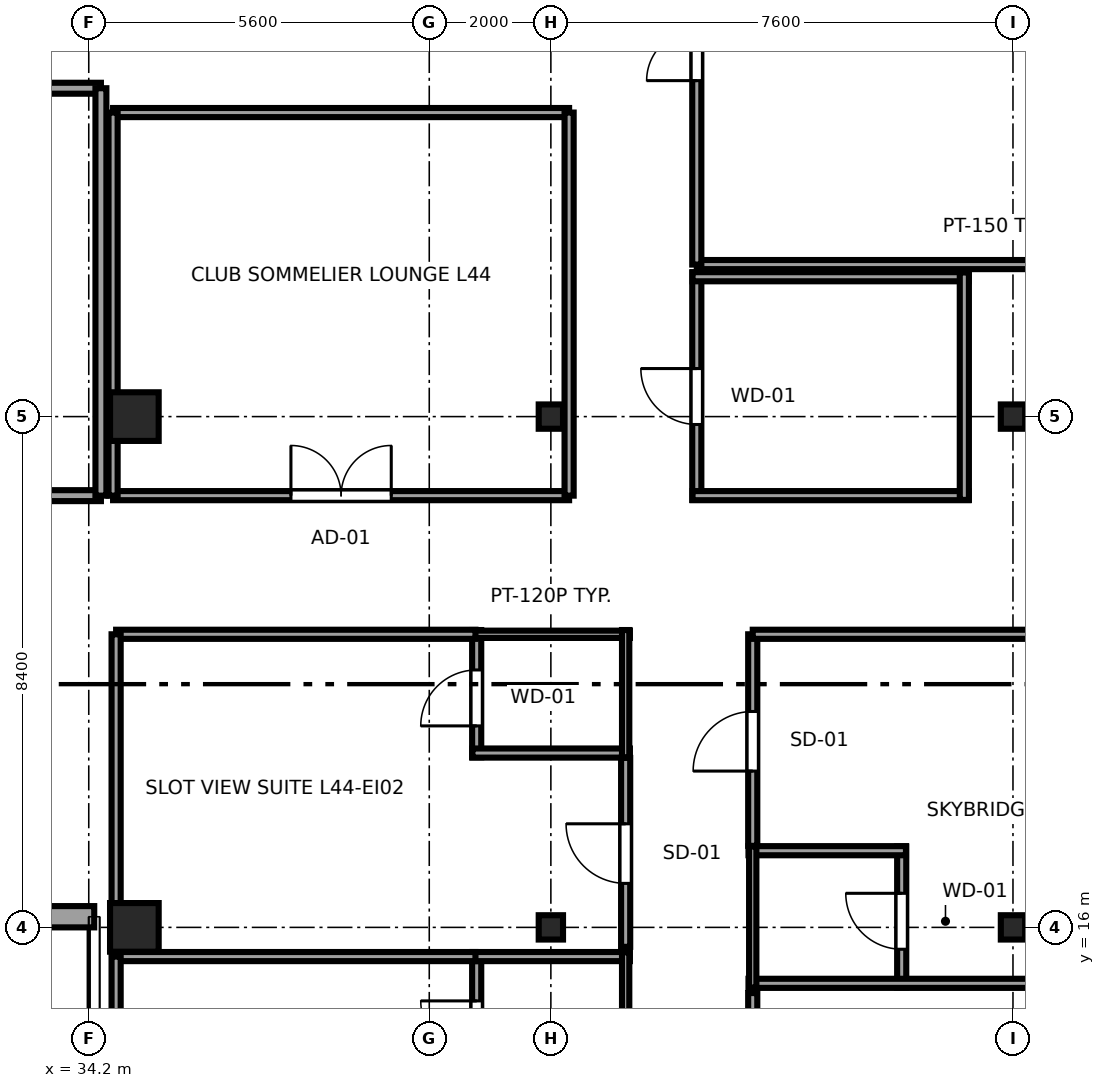
"""IFC4 building model, lengths in metres.
Left out: names, types, materials, properties, quantities, classifications, styles, units other than length and angle.
Written with IfcOpenShell. Run it as: python <this file> out.ifc"""

import sys

from ifc_helpers import new_model, si_unit, direction, frame, frame_2d, origin, origin_2d, place, context, subcontext, project, spatial, rectangle, i_section, extrude, source, transform, mapped, element, fill, save


model = new_model("IFC4")
c1 = context("Model", 3, precision=1e-05, world=origin(), true_north=direction((0.0, 1.0)))
c2 = subcontext(c1, "Body", "Model", "MODEL_VIEW")
j1 = project(units=[si_unit("LENGTHUNIT", "METRE"), si_unit("PLANEANGLEUNIT", "RADIAN")], contexts=[c1])
p1 = place(None, origin())
s1 = spatial("IfcSite", under=j1, at=p1, CompositionType="ELEMENT")
p2 = place(p1, origin())
s2 = spatial("IfcBuilding", under=s1, at=p2, CompositionType="ELEMENT")
p3 = place(p2, frame((0.0, 0.0, 168.35)))
s3 = spatial("IfcBuildingStorey", under=s2, at=p3, CompositionType="ELEMENT", Elevation=168.35)
m1 = source(origin(), c2, "Body", "SweptSolid", [
    extrude(rectangle(XDim=0.8, YDim=0.8, at=origin_2d()), origin(), (0.0, 0.0, 1.0), 3.55),
])
for number, where, z_axis, x_axis in (
    (1, (34.95, 16.0, 0.0), (0.0, 0.0, 1.0), (1.0, 0.0, 0.0)),
    (2, (34.95, 24.4, 0.0), (0.0, 0.0, 1.0), (1.0, 0.0, 0.0)),
):
    element("IfcColumn", number, at=place(p3, frame(where, z_axis=z_axis, x_axis=x_axis)), inside=s3, PredefinedType="COLUMN", context=c2, shape_type="MappedRepresentation", body=[
        mapped(m1, transform((0.0, 0.0, 0.0), x_axis=(1.0, 0.0, 0.0), y_axis=(0.0, 1.0, 0.0), z_axis=(0.0, 0.0, 1.0), scale=1.0)),
    ])
m2 = source(origin(), c2, "Body", "SweptSolid", [
    extrude(i_section(OverallWidth=0.4, OverallDepth=0.4, WebThickness=0.02, FlangeThickness=0.035, at=origin_2d()), origin(), (0.0, 0.0, 1.0), 3.55),
])
for number, where, z_axis, x_axis in (
    (3, (41.8, 16.0, 0.0), (0.0, 0.0, 1.0), (1.0, 0.0, 0.0)),
    (4, (41.8, 24.4, 0.0), (0.0, 0.0, 1.0), (1.0, 0.0, 0.0)),
    (5, (49.4, 16.0, 0.0), (0.0, 0.0, 1.0), (1.0, 0.0, 0.0)),
    (6, (49.4, 24.4, 0.0), (0.0, 0.0, 1.0), (1.0, 0.0, 0.0)),
):
    element("IfcColumn", number, at=place(p3, frame(where, z_axis=z_axis, x_axis=x_axis)), inside=s3, PredefinedType="COLUMN", context=c2, shape_type="MappedRepresentation", body=[
        mapped(m2, transform((0.0, 0.0, 0.0), x_axis=(1.0, 0.0, 0.0), y_axis=(0.0, 1.0, 0.0), z_axis=(0.0, 0.0, 1.0), scale=1.0)),
    ])
p4 = place(p3, frame((22.71, 16.175, 0.0), z_axis=(0.0, 0.0, 1.0), x_axis=(1.0, 0.0, 0.0)))
e7 = element("IfcWall", 7, at=p4, inside=s3, PredefinedType="SOLIDWALL", context=c2, shape_type="SweptSolid", body=[
    extrude(rectangle(XDim=11.58, YDim=0.35, at=frame_2d((5.79, 0.0))), origin(), (0.0, 0.0, 1.0), 2.758),
])
p5 = place(p4, frame((1.995, 0.0, 0.68)))
e8 = element("IfcOpeningElement", 8, at=p5, cuts=e7, PredefinedType="OPENING", context=c2, shape_type="SweptSolid", body=[
    extrude(rectangle(XDim=2.4, YDim=1.9, at=frame_2d((1.2, 0.95))), frame((0.0, 0.185, 0.0), z_axis=(0.0, -1.0, 0.0), x_axis=(1.0, 0.0, 0.0)), (0.0, 0.0, 1.0), 0.37),
])
p6 = place(p4, frame((7.185, 0.0, 0.68)))
e9 = element("IfcOpeningElement", 9, at=p6, cuts=e7, PredefinedType="OPENING", context=c2, shape_type="SweptSolid", body=[
    extrude(rectangle(XDim=2.4, YDim=1.9, at=frame_2d((1.2, 0.95))), frame((0.0, 0.185, 0.0), z_axis=(0.0, -1.0, 0.0), x_axis=(1.0, 0.0, 0.0)), (0.0, 0.0, 1.0), 0.37),
])
p7 = place(p3, frame((40.58, 13.212, 0.0), z_axis=(0.0, 0.0, 1.0), x_axis=(0.0, 1.0, 0.0)))
e10 = element("IfcWall", 10, at=p7, inside=s3, PredefinedType="PARTITIONING", context=c2, shape_type="SweptSolid", body=[
    extrude(rectangle(XDim=2.378, YDim=0.15, at=frame_2d((1.189, 0.0))), origin(), (0.0, 0.0, 1.0), 3.37),
])
p8 = place(p7, frame((0.659, 0.0, 0.0)))
e11 = element("IfcOpeningElement", 11, at=p8, cuts=e10, PredefinedType="OPENING", context=c2, shape_type="SweptSolid", body=[
    extrude(rectangle(XDim=0.92, YDim=2.01, at=frame_2d((0.46, 1.005))), frame((0.0, 0.085, 0.0), z_axis=(0.0, -1.0, 0.0), x_axis=(1.0, 0.0, 0.0)), (0.0, 0.0, 1.0), 0.17),
])
p9 = place(p3, frame((40.51, 15.52, 0.0), z_axis=(0.0, 0.0, 1.0), x_axis=(1.0, 0.0, 0.0)))
e12 = element("IfcWall", 12, at=p9, inside=s3, PredefinedType="PARTITIONING", context=c2, shape_type="SweptSolid", body=[
    extrude(rectangle(XDim=2.59, YDim=0.15, at=frame_2d((1.295, 0.0))), origin(), (0.0, 0.0, 1.0), 3.37),
])
p10 = place(p3, frame((43.03, 13.212, 0.0), z_axis=(0.0, 0.0, 1.0), x_axis=(0.0, 1.0, 0.0)))
e13 = element("IfcWall", 13, at=p10, inside=s3, PredefinedType="PLUMBINGWALL", context=c2, shape_type="SweptSolid", body=[
    extrude(rectangle(XDim=2.378, YDim=0.12, at=frame_2d((1.189, 0.0))), origin(), (0.0, 0.0, 1.0), 3.37),
])
p11 = place(p3, frame((40.58, 18.797, 0.0), z_axis=(0.0, 0.0, 1.0), x_axis=(0.0, 1.0, 0.0)))
e14 = element("IfcWall", 14, at=p11, inside=s3, PredefinedType="PARTITIONING", context=c2, shape_type="SweptSolid", body=[
    extrude(rectangle(XDim=2.093, YDim=0.15, at=frame_2d((1.046, 0.0))), origin(), (0.0, 0.0, 1.0), 3.37),
])
p12 = place(p11, frame((0.517, 0.0, 0.0)))
e15 = element("IfcOpeningElement", 15, at=p12, cuts=e14, PredefinedType="OPENING", context=c2, shape_type="SweptSolid", body=[
    extrude(rectangle(XDim=0.92, YDim=2.01, at=frame_2d((0.46, 1.005))), frame((0.0, 0.085, 0.0), z_axis=(0.0, -1.0, 0.0), x_axis=(1.0, 0.0, 0.0)), (0.0, 0.0, 1.0), 0.17),
])
p13 = place(p3, frame((40.51, 18.867, 0.0), z_axis=(0.0, 0.0, 1.0), x_axis=(1.0, 0.0, 0.0)))
e16 = element("IfcWall", 16, at=p13, inside=s3, PredefinedType="PARTITIONING", context=c2, shape_type="SweptSolid", body=[
    extrude(rectangle(XDim=2.59, YDim=0.15, at=frame_2d((1.295, 0.0))), origin(), (0.0, 0.0, 1.0), 3.37),
])
p14 = place(p3, frame((40.51, 20.82, 0.0), z_axis=(0.0, 0.0, 1.0), x_axis=(1.0, 0.0, 0.0)))
e17 = element("IfcWall", 17, at=p14, inside=s3, PredefinedType="PLUMBINGWALL", context=c2, shape_type="SweptSolid", body=[
    extrude(rectangle(XDim=2.59, YDim=0.12, at=frame_2d((1.295, 0.0))), origin(), (0.0, 0.0, 1.0), 3.37),
])
p15 = place(p3, frame((43.03, 18.797, 0.0), z_axis=(0.0, 0.0, 1.0), x_axis=(0.0, 1.0, 0.0)))
e18 = element("IfcWall", 18, at=p15, inside=s3, PredefinedType="PLUMBINGWALL", context=c2, shape_type="SweptSolid", body=[
    extrude(rectangle(XDim=2.093, YDim=0.12, at=frame_2d((1.046, 0.0))), origin(), (0.0, 0.0, 1.0), 3.37),
])
p16 = place(p3, frame((47.57, 15.01, 0.0), z_axis=(0.0, 0.0, 1.0), x_axis=(0.0, 1.0, 0.0)))
e19 = element("IfcWall", 19, at=p16, inside=s3, PredefinedType="PARTITIONING", context=c2, shape_type="SweptSolid", body=[
    extrude(rectangle(XDim=2.321, YDim=0.15, at=frame_2d((1.161, 0.0))), origin(), (0.0, 0.0, 1.0), 3.37),
])
p17 = place(p16, frame((0.631, 0.0, 0.0)))
e20 = element("IfcOpeningElement", 20, at=p17, cuts=e19, PredefinedType="OPENING", context=c2, shape_type="SweptSolid", body=[
    extrude(rectangle(XDim=0.92, YDim=2.01, at=frame_2d((0.46, 1.005))), frame((0.0, 0.085, 0.0), z_axis=(0.0, -1.0, 0.0), x_axis=(1.0, 0.0, 0.0)), (0.0, 0.0, 1.0), 0.17),
])
p18 = place(p3, frame((45.05, 15.08, 0.0), z_axis=(0.0, 0.0, 1.0), x_axis=(1.0, 0.0, 0.0)))
e21 = element("IfcWall", 21, at=p18, inside=s3, PredefinedType="PARTITIONING", context=c2, shape_type="SweptSolid", body=[
    extrude(rectangle(XDim=9.05, YDim=0.15, at=frame_2d((4.525, 0.0))), origin(), (0.0, 0.0, 1.0), 3.37),
])
p19 = place(p3, frame((45.05, 17.261, 0.0), z_axis=(0.0, 0.0, 1.0), x_axis=(1.0, 0.0, 0.0)))
e22 = element("IfcWall", 22, at=p19, inside=s3, PredefinedType="PARTITIONING", context=c2, shape_type="SweptSolid", body=[
    extrude(rectangle(XDim=2.59, YDim=0.15, at=frame_2d((1.295, 0.0))), origin(), (0.0, 0.0, 1.0), 3.37),
])
p20 = place(p3, frame((45.12, 15.01, 0.0), z_axis=(0.0, 0.0, 1.0), x_axis=(0.0, 1.0, 0.0)))
e23 = element("IfcWall", 23, at=p20, inside=s3, PredefinedType="PLUMBINGWALL", context=c2, shape_type="SweptSolid", body=[
    extrude(rectangle(XDim=2.321, YDim=0.12, at=frame_2d((1.161, 0.0))), origin(), (0.0, 0.0, 1.0), 3.37),
])
p21 = place(p3, frame((34.65, 15.52, 0.0), z_axis=(0.0, 0.0, 1.0), x_axis=(1.0, 0.0, 0.0)))
e24 = element("IfcWall", 24, at=p21, inside=s3, PredefinedType="PARTITIONING", context=c2, shape_type="SweptSolid", body=[
    extrude(rectangle(XDim=5.91, YDim=0.15, at=frame_2d((2.955, 0.0))), origin(), (0.0, 0.0, 1.0), 3.37),
])
p22 = place(p3, frame((34.65, 9.63, 0.0), z_axis=(0.0, 0.0, 1.0), x_axis=(0.0, 1.0, 0.0)))
e25 = element("IfcWall", 25, at=p22, inside=s3, PredefinedType="PARTITIONING", context=c2, shape_type="SweptSolid", body=[
    extrude(rectangle(XDim=5.89, YDim=0.15, at=frame_2d((2.945, 0.0))), origin(), (0.0, 0.0, 1.0), 3.37),
])
p23 = place(p3, frame((43.03, 15.68, 0.0), z_axis=(0.0, 0.0, 1.0), x_axis=(0.0, 1.0, 0.0)))
e26 = element("IfcWall", 26, at=p23, inside=s3, PredefinedType="PARTITIONING", context=c2, shape_type="SweptSolid", body=[
    extrude(rectangle(XDim=3.107, YDim=0.15, at=frame_2d((1.554, 0.0))), origin(), (0.0, 0.0, 1.0), 3.37),
])
p24 = place(p23, frame((1.043, 0.0, 0.0)))
e27 = element("IfcOpeningElement", 27, at=p24, cuts=e26, PredefinedType="OPENING", context=c2, shape_type="SweptSolid", body=[
    extrude(rectangle(XDim=0.98, YDim=2.12, at=frame_2d((0.49, 1.06))), frame((0.0, 0.085, 0.0), z_axis=(0.0, -1.0, 0.0), x_axis=(1.0, 0.0, 0.0)), (0.0, 0.0, 1.0), 0.17),
])
p25 = place(p3, frame((34.65, 20.82, 0.0), z_axis=(0.0, 0.0, 1.0), x_axis=(1.0, 0.0, 0.0)))
e28 = element("IfcWall", 28, at=p25, inside=s3, PredefinedType="PARTITIONING", context=c2, shape_type="SweptSolid", body=[
    extrude(rectangle(XDim=5.91, YDim=0.15, at=frame_2d((2.955, 0.0))), origin(), (0.0, 0.0, 1.0), 3.37),
])
p26 = place(p3, frame((34.65, 15.68, 0.0), z_axis=(0.0, 0.0, 1.0), x_axis=(0.0, 1.0, 0.0)))
e29 = element("IfcWall", 29, at=p26, inside=s3, PredefinedType="PARTITIONING", context=c2, shape_type="SweptSolid", body=[
    extrude(rectangle(XDim=5.14, YDim=0.15, at=frame_2d((2.57, 0.0))), origin(), (0.0, 0.0, 1.0), 3.37),
])
p27 = place(p3, frame((45.12, 11.379, 0.0), z_axis=(0.0, 0.0, 1.0), x_axis=(0.0, 1.0, 0.0)))
e30 = element("IfcWall", 30, at=p27, inside=s3, PredefinedType="PARTITIONING", context=c2, shape_type="SweptSolid", body=[
    extrude(rectangle(XDim=3.541, YDim=0.15, at=frame_2d((1.771, 0.0))), origin(), (0.0, 0.0, 1.0), 3.37),
])
p28 = place(p27, frame((1.26, 0.0, 0.0)))
e31 = element("IfcOpeningElement", 31, at=p28, cuts=e30, PredefinedType="OPENING", context=c2, shape_type="SweptSolid", body=[
    extrude(rectangle(XDim=0.98, YDim=2.12, at=frame_2d((0.49, 1.06))), frame((0.0, 0.085, 0.0), z_axis=(0.0, -1.0, 0.0), x_axis=(1.0, 0.0, 0.0)), (0.0, 0.0, 1.0), 0.17),
])
p29 = place(p3, frame((45.12, 17.341, 0.0), z_axis=(0.0, 0.0, 1.0), x_axis=(0.0, 1.0, 0.0)))
e32 = element("IfcWall", 32, at=p29, inside=s3, PredefinedType="PARTITIONING", context=c2, shape_type="SweptSolid", body=[
    extrude(rectangle(XDim=3.479, YDim=0.15, at=frame_2d((1.74, 0.0))), origin(), (0.0, 0.0, 1.0), 3.37),
])
p30 = place(p29, frame((1.229, 0.0, 0.0)))
e33 = element("IfcOpeningElement", 33, at=p30, cuts=e32, PredefinedType="OPENING", context=c2, shape_type="SweptSolid", body=[
    extrude(rectangle(XDim=0.98, YDim=2.12, at=frame_2d((0.49, 1.06))), frame((0.0, 0.085, 0.0), z_axis=(0.0, -1.0, 0.0), x_axis=(1.0, 0.0, 0.0)), (0.0, 0.0, 1.0), 0.17),
])
p31 = place(p3, frame((45.12, 20.82, 0.0), z_axis=(0.0, 0.0, 1.0), x_axis=(1.0, 0.0, 0.0)))
e34 = element("IfcWall", 34, at=p31, inside=s3, PredefinedType="PARTITIONING", context=c2, shape_type="SweptSolid", body=[
    extrude(rectangle(XDim=8.98, YDim=0.15, at=frame_2d((4.49, 0.0))), origin(), (0.0, 0.0, 1.0), 3.37),
])
p32 = place(p3, frame((44.2, 23.03, 0.0), z_axis=(0.0, 0.0, 1.0), x_axis=(0.0, 1.0, 0.0)))
e35 = element("IfcWall", 35, at=p32, inside=s3, PredefinedType="PARTITIONING", context=c2, shape_type="SweptSolid", body=[
    extrude(rectangle(XDim=3.74, YDim=0.15, at=frame_2d((1.87, 0.0))), origin(), (0.0, 0.0, 1.0), 3.37),
])
p33 = place(p32, frame((1.24, 0.0, 0.0)))
e36 = element("IfcOpeningElement", 36, at=p33, cuts=e35, PredefinedType="OPENING", context=c2, shape_type="SweptSolid", body=[
    extrude(rectangle(XDim=0.92, YDim=2.01, at=frame_2d((0.46, 1.005))), frame((0.0, 0.085, 0.0), z_axis=(0.0, -1.0, 0.0), x_axis=(1.0, 0.0, 0.0)), (0.0, 0.0, 1.0), 0.17),
])
for number, where, z_axis, x_axis in (
    (37, (44.13, 23.1, 0.0), (0.0, 0.0, 1.0), (1.0, 0.0, 0.0)),
    (38, (44.13, 26.7, 0.0), (0.0, 0.0, 1.0), (1.0, 0.0, 0.0)),
):
    element("IfcWall", number, at=place(p3, frame(where, z_axis=z_axis, x_axis=x_axis)), inside=s3, PredefinedType="PARTITIONING", context=c2, shape_type="SweptSolid", body=[
        extrude(rectangle(XDim=4.54, YDim=0.15, at=frame_2d((2.27, 0.0))), origin(), (0.0, 0.0, 1.0), 3.37),
    ])
p34 = place(p3, frame((48.6, 23.03, 0.0), z_axis=(0.0, 0.0, 1.0), x_axis=(0.0, 1.0, 0.0)))
e39 = element("IfcWall", 39, at=p34, inside=s3, PredefinedType="PARTITIONING", context=c2, shape_type="SweptSolid", body=[
    extrude(rectangle(XDim=3.74, YDim=0.15, at=frame_2d((1.87, 0.0))), origin(), (0.0, 0.0, 1.0), 3.37),
])
p35 = place(p3, frame((44.2, 26.9, 0.0), z_axis=(0.0, 0.0, 1.0), x_axis=(1.0, 0.0, 0.0)))
e40 = element("IfcWall", 40, at=p35, inside=s3, PredefinedType="PARTITIONING", context=c2, shape_type="SweptSolid", body=[
    extrude(rectangle(XDim=9.9, YDim=0.15, at=frame_2d((4.95, 0.0))), origin(), (0.0, 0.0, 1.0), 3.37),
])
p36 = place(p3, frame((44.2, 26.9, 0.0), z_axis=(0.0, 0.0, 1.0), x_axis=(0.0, 1.0, 0.0)))
e41 = element("IfcWall", 41, at=p36, inside=s3, PredefinedType="PARTITIONING", context=c2, shape_type="SweptSolid", body=[
    extrude(rectangle(XDim=7.7, YDim=0.15, at=frame_2d((3.85, 0.0))), origin(), (0.0, 0.0, 1.0), 3.37),
])
p37 = place(p36, frame((3.025, 0.0, 0.0)))
e42 = element("IfcOpeningElement", 42, at=p37, cuts=e41, PredefinedType="OPENING", context=c2, shape_type="SweptSolid", body=[
    extrude(rectangle(XDim=1.65, YDim=2.15, at=frame_2d((0.825, 1.075))), frame((0.0, 0.085, 0.0), z_axis=(0.0, -1.0, 0.0), x_axis=(1.0, 0.0, 0.0)), (0.0, 0.0, 1.0), 0.17),
])
p38 = place(p3, frame((27.1, 23.1, 0.0), z_axis=(0.0, 0.0, 1.0), x_axis=(1.0, 0.0, 0.0)))
e43 = element("IfcWall", 43, at=p38, inside=s3, PredefinedType="PARTITIONING", context=c2, shape_type="SweptSolid", body=[
    extrude(rectangle(XDim=7.3, YDim=0.18, at=frame_2d((3.65, 0.0))), origin(), (0.0, 0.0, 1.0), 3.37),
])
p39 = place(p38, frame((2.825, 0.0, 0.0)))
e44 = element("IfcOpeningElement", 44, at=p39, cuts=e43, PredefinedType="OPENING", context=c2, shape_type="SweptSolid", body=[
    extrude(rectangle(XDim=1.65, YDim=2.15, at=frame_2d((0.825, 1.075))), frame((0.0, 0.1, 0.0), z_axis=(0.0, -1.0, 0.0), x_axis=(1.0, 0.0, 0.0)), (0.0, 0.0, 1.0), 0.2),
])
p40 = place(p3, frame((27.1, 29.8, 0.0), z_axis=(0.0, 0.0, 1.0), x_axis=(1.0, 0.0, 0.0)))
e45 = element("IfcWall", 45, at=p40, inside=s3, PredefinedType="PARTITIONING", context=c2, shape_type="SweptSolid", body=[
    extrude(rectangle(XDim=7.3, YDim=0.18, at=frame_2d((3.65, 0.0))), origin(), (0.0, 0.0, 1.0), 3.37),
])
p41 = place(p3, frame((34.4, 23.1, 0.0), z_axis=(0.0, 0.0, 1.0), x_axis=(0.0, 1.0, 0.0)))
e46 = element("IfcWall", 46, at=p41, inside=s3, PredefinedType="PARTITIONING", context=c2, shape_type="SweptSolid", body=[
    extrude(rectangle(XDim=6.7, YDim=0.18, at=frame_2d((3.35, 0.0))), origin(), (0.0, 0.0, 1.0), 3.37),
])
p42 = place(p3, frame((34.6, 23.1, 0.0), z_axis=(0.0, 0.0, 1.0), x_axis=(1.0, 0.0, 0.0)))
e47 = element("IfcWall", 47, at=p42, inside=s3, PredefinedType="PARTITIONING", context=c2, shape_type="SweptSolid", body=[
    extrude(rectangle(XDim=7.5, YDim=0.15, at=frame_2d((3.75, 0.0))), origin(), (0.0, 0.0, 1.0), 3.37),
])
p43 = place(p42, frame((2.925, 0.0, 0.0)))
e48 = element("IfcOpeningElement", 48, at=p43, cuts=e47, PredefinedType="OPENING", context=c2, shape_type="SweptSolid", body=[
    extrude(rectangle(XDim=1.65, YDim=2.15, at=frame_2d((0.825, 1.075))), frame((0.0, 0.085, 0.0), z_axis=(0.0, -1.0, 0.0), x_axis=(1.0, 0.0, 0.0)), (0.0, 0.0, 1.0), 0.17),
])
p44 = place(p3, frame((34.6, 29.4, 0.0), z_axis=(0.0, 0.0, 1.0), x_axis=(1.0, 0.0, 0.0)))
e49 = element("IfcWall", 49, at=p44, inside=s3, PredefinedType="PARTITIONING", context=c2, shape_type="SweptSolid", body=[
    extrude(rectangle(XDim=7.5, YDim=0.15, at=frame_2d((3.75, 0.0))), origin(), (0.0, 0.0, 1.0), 3.37),
])
p45 = place(p3, frame((34.6, 23.1, 0.0), z_axis=(0.0, 0.0, 1.0), x_axis=(0.0, 1.0, 0.0)))
e50 = element("IfcWall", 50, at=p45, inside=s3, PredefinedType="PARTITIONING", context=c2, shape_type="SweptSolid", body=[
    extrude(rectangle(XDim=6.3, YDim=0.15, at=frame_2d((3.15, 0.0))), origin(), (0.0, 0.0, 1.0), 3.37),
])
p46 = place(p3, frame((42.1, 23.1, 0.0), z_axis=(0.0, 0.0, 1.0), x_axis=(0.0, 1.0, 0.0)))
e51 = element("IfcWall", 51, at=p46, inside=s3, PredefinedType="PARTITIONING", context=c2, shape_type="SweptSolid", body=[
    extrude(rectangle(XDim=6.3, YDim=0.15, at=frame_2d((3.15, 0.0))), origin(), (0.0, 0.0, 1.0), 2.16),
])
m3 = source(origin(), c2, "Body", "SweptSolid", [
    extrude(rectangle(XDim=0.92, YDim=2.01, at=frame_2d((0.46, 1.005))), frame((0.0, 0.025, 0.0), z_axis=(0.0, -1.0, 0.0), x_axis=(1.0, 0.0, 0.0)), (0.0, 0.0, 1.0), 0.05),
])
p47 = place(p8, origin())
e52 = element("IfcDoor", 52, at=p47, inside=s3, OperationType="SINGLE_SWING_RIGHT", PredefinedType="DOOR", context=c2, shape_type="MappedRepresentation", body=[
    mapped(m3, transform((0.0, 0.0, 0.0), x_axis=(1.0, 0.0, 0.0), y_axis=(0.0, 1.0, 0.0), z_axis=(0.0, 0.0, 1.0), scale=1.0)),
])
fill(e11, e52)
p48 = place(p12, origin())
e53 = element("IfcDoor", 53, at=p48, inside=s3, OperationType="SINGLE_SWING_LEFT", PredefinedType="DOOR", context=c2, shape_type="MappedRepresentation", body=[
    mapped(m3, transform((0.0, 0.0, 0.0), x_axis=(1.0, 0.0, 0.0), y_axis=(0.0, 1.0, 0.0), z_axis=(0.0, 0.0, 1.0), scale=1.0)),
])
fill(e15, e53)
p49 = place(p17, origin())
e54 = element("IfcDoor", 54, at=p49, inside=s3, OperationType="SINGLE_SWING_RIGHT", PredefinedType="DOOR", context=c2, shape_type="MappedRepresentation", body=[
    mapped(m3, transform((0.0, 0.0, 0.0), x_axis=(1.0, 0.0, 0.0), y_axis=(0.0, 1.0, 0.0), z_axis=(0.0, 0.0, 1.0), scale=1.0)),
])
fill(e20, e54)
m4 = source(origin(), c2, "Body", "SweptSolid", [
    extrude(rectangle(XDim=0.98, YDim=2.12, at=frame_2d((0.49, 1.06))), frame((0.0, 0.025, 0.0), z_axis=(0.0, -1.0, 0.0), x_axis=(1.0, 0.0, 0.0)), (0.0, 0.0, 1.0), 0.05),
])
p50 = place(p24, origin())
e55 = element("IfcDoor", 55, at=p50, inside=s3, OperationType="SINGLE_SWING_RIGHT", PredefinedType="DOOR", context=c2, shape_type="MappedRepresentation", body=[
    mapped(m4, transform((0.0, 0.0, 0.0), x_axis=(1.0, 0.0, 0.0), y_axis=(0.0, 1.0, 0.0), z_axis=(0.0, 0.0, 1.0), scale=1.0)),
])
fill(e27, e55)
p51 = place(p30, origin())
e56 = element("IfcDoor", 56, at=p51, inside=s3, OperationType="SINGLE_SWING_LEFT", PredefinedType="DOOR", context=c2, shape_type="MappedRepresentation", body=[
    mapped(m4, transform((0.0, 0.0, 0.0), x_axis=(1.0, 0.0, 0.0), y_axis=(0.0, 1.0, 0.0), z_axis=(0.0, 0.0, 1.0), scale=1.0)),
])
fill(e33, e56)
p52 = place(p33, origin())
e57 = element("IfcDoor", 57, at=p52, inside=s3, OperationType="SINGLE_SWING_RIGHT", PredefinedType="DOOR", context=c2, shape_type="MappedRepresentation", body=[
    mapped(m3, transform((0.0, 0.0, 0.0), x_axis=(1.0, 0.0, 0.0), y_axis=(0.0, 1.0, 0.0), z_axis=(0.0, 0.0, 1.0), scale=1.0)),
])
fill(e36, e57)
m5 = source(origin(), c2, "Body", "SweptSolid", [
    extrude(rectangle(XDim=1.65, YDim=2.15, at=frame_2d((0.825, 1.075))), frame((0.0, 0.025, 0.0), z_axis=(0.0, -1.0, 0.0), x_axis=(1.0, 0.0, 0.0)), (0.0, 0.0, 1.0), 0.05),
])
p53 = place(p37, origin())
e58 = element("IfcDoor", 58, at=p53, inside=s3, OperationType="DOUBLE_DOOR_SINGLE_SWING", PredefinedType="DOOR", context=c2, shape_type="MappedRepresentation", body=[
    mapped(m5, transform((0.0, 0.0, 0.0), x_axis=(1.0, 0.0, 0.0), y_axis=(0.0, 1.0, 0.0), z_axis=(0.0, 0.0, 1.0), scale=1.0)),
])
fill(e42, e58)
p54 = place(p43, origin())
e59 = element("IfcDoor", 59, at=p54, inside=s3, OperationType="DOUBLE_DOOR_SINGLE_SWING", PredefinedType="DOOR", context=c2, shape_type="MappedRepresentation", body=[
    mapped(m5, transform((0.0, 0.0, 0.0), x_axis=(1.0, 0.0, 0.0), y_axis=(0.0, 1.0, 0.0), z_axis=(0.0, 0.0, 1.0), scale=1.0)),
])
fill(e48, e59)
save(model, sys.argv[1])
